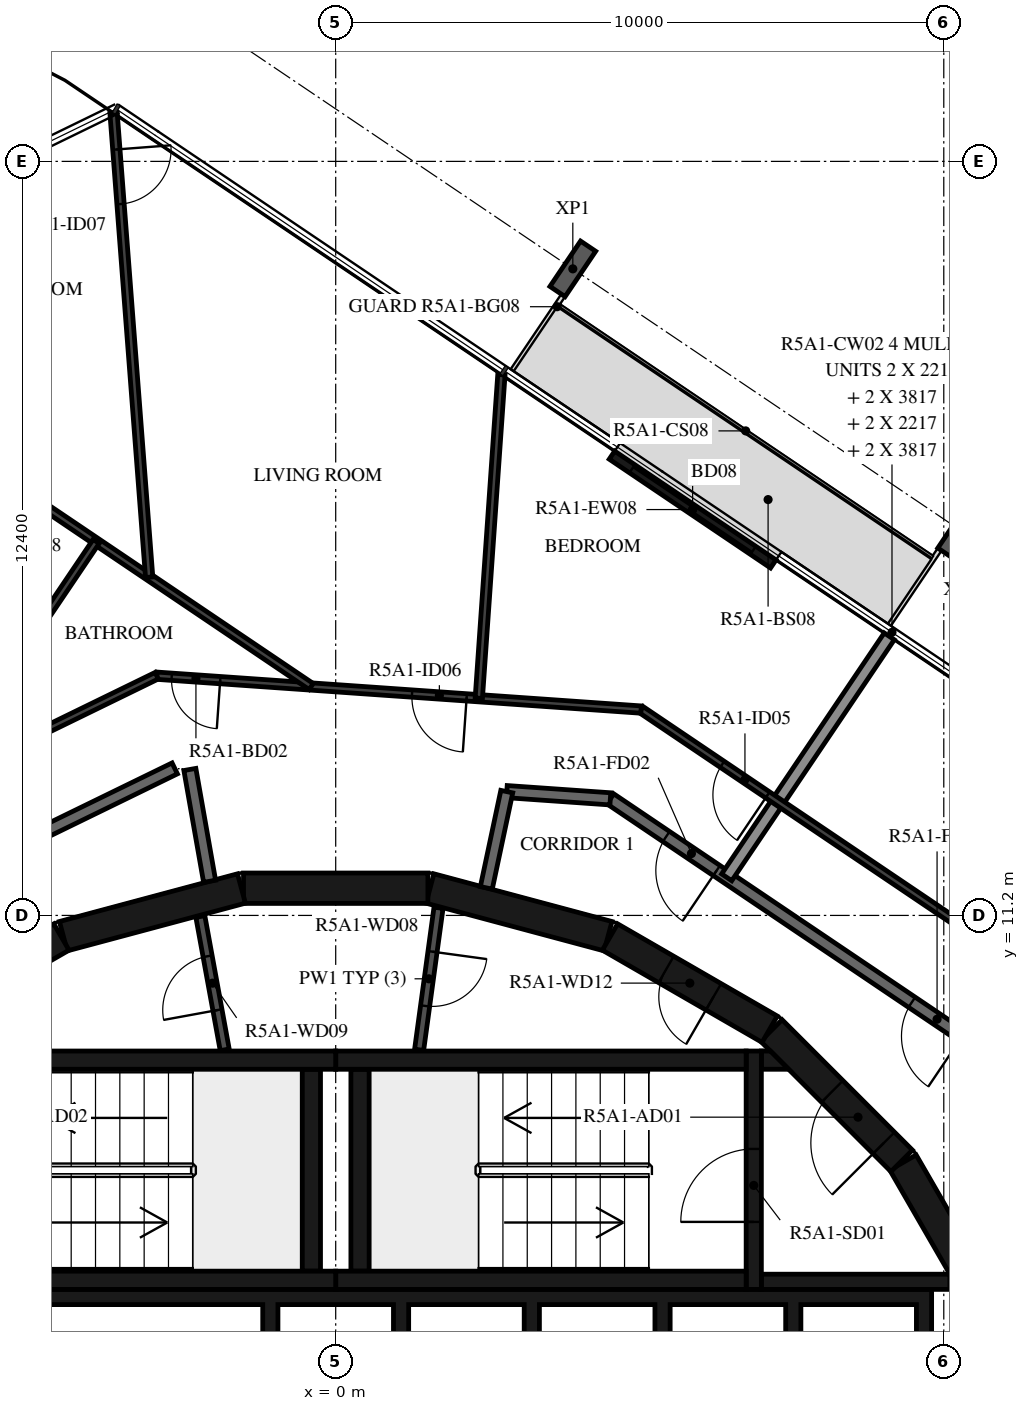
"""IFC4 building model, lengths in metres.
Left out: names, types, materials, properties, quantities, classifications, styles, units other than length and angle.
Written with IfcOpenShell. Run it as: python <this file> out.ifc"""

import sys

from ifc_helpers import new_model, si_unit, direction, frame, frame_2d, origin, origin_2d, place, context, subcontext, project, spatial, polyline, rectangle, i_section, outline, extrude, element, fill, save


model = new_model("IFC4")
c1 = context("Model", 3, precision=1e-05, world=origin(), true_north=direction((0.0, 1.0)))
c2 = subcontext(c1, "Body", "Model", "MODEL_VIEW")
j1 = project(units=[si_unit("LENGTHUNIT", "METRE"), si_unit("PLANEANGLEUNIT", "RADIAN")], contexts=[c1])
p1 = place(None, origin())
s1 = spatial("IfcSite", under=j1, at=p1, CompositionType="ELEMENT")
p2 = place(p1, origin())
s2 = spatial("IfcBuilding", under=s1, at=p2, CompositionType="ELEMENT")
p3 = place(p2, frame((0.0, 0.0, 191.9)))
s3 = spatial("IfcBuildingStorey", under=s2, at=p3, CompositionType="ELEMENT", Elevation=191.9)
for number, where, z_axis, x_axis in (
    (1, (10.278, 17.531, -0.38), (0.0, 0.0, 1.0), (0.829, -0.559, 0.0)),
    (2, (3.899, 21.833, -0.38), (0.0, 0.0, 1.0), (0.829, -0.559, 0.0)),
):
    element("IfcColumn", number, at=place(p3, frame(where, z_axis=z_axis, x_axis=x_axis)), inside=s3, PredefinedType="COLUMN", context=c2, shape_type="SweptSolid", body=[
        extrude(i_section(OverallWidth=0.3, OverallDepth=0.9, WebThickness=0.019, FlangeThickness=0.035, FilletRadius=0.03, at=origin_2d()), origin(), (0.0, 0.0, 1.0), 3.5),
    ])
p4 = place(p3, frame((7.196, 16.98, 0.0), z_axis=(0.0, 0.0, 1.0), x_axis=(-0.829044984211, 0.559181915082, 0.0)))
e3 = element("IfcWall", 3, at=p4, inside=s3, PredefinedType="STANDARD", context=c2, shape_type="SweptSolid", body=[
    extrude(rectangle(XDim=3.2, YDim=0.16, at=frame_2d((1.6, 0.0))), origin(), (0.0, 0.0, 1.0), 3.12),
])
p5 = place(p4, frame((0.4, 0.0, 0.0)))
e4 = element("IfcOpeningElement", 4, at=p5, cuts=e3, PredefinedType="OPENING", context=c2, shape_type="SweptSolid", body=[
    extrude(rectangle(XDim=2.4, YDim=2.4, at=frame_2d((1.2, 1.2))), frame((0.0, 0.09, 0.0), z_axis=(0.0, -1.0, 0.0), x_axis=(1.0, 0.0, 0.0)), (0.0, 0.0, 1.0), 0.18),
])
p6 = place(p3, frame((10.845, 4.51, 0.0), z_axis=(0.0, 0.0, 1.0), x_axis=(-0.500087131594, 0.865975092491, 0.0)))
e5 = element("IfcWall", 5, at=p6, inside=s3, PredefinedType="SHEAR", context=c2, shape_type="SweptSolid", body=[
    extrude(rectangle(XDim=3.033, YDim=0.5, at=frame_2d((1.516, 0.0))), origin(), (0.0, 0.0, 1.0), 3.12),
])
p7 = place(p3, frame((9.308, 7.164, 0.0), z_axis=(0.0, 0.0, 1.0), x_axis=(-0.707106781187, 0.707106781187, 0.0)))
e6 = element("IfcWall", 6, at=p7, inside=s3, PredefinedType="SHEAR", context=c2, shape_type="SweptSolid", body=[
    extrude(rectangle(XDim=3.032, YDim=0.5, at=frame_2d((1.516, 0.0))), origin(), (0.0, 0.0, 1.0), 3.12),
])
p8 = place(p7, frame((0.416, 0.0, 0.0)))
e7 = element("IfcOpeningElement", 7, at=p8, cuts=e6, PredefinedType="OPENING", context=c2, shape_type="SweptSolid", body=[
    extrude(rectangle(XDim=1.2, YDim=2.1, at=frame_2d((0.6, 1.05))), frame((0.0, 0.26, 0.0), z_axis=(0.0, -1.0, 0.0), x_axis=(1.0, 0.0, 0.0)), (0.0, 0.0, 1.0), 0.52),
])
p9 = place(p3, frame((7.137, 9.329, 0.0), z_axis=(0.0, 0.0, 1.0), x_axis=(-0.865975092491, 0.500087131594, 0.0)))
e8 = element("IfcWall", 8, at=p9, inside=s3, PredefinedType="SHEAR", context=c2, shape_type="SweptSolid", body=[
    extrude(rectangle(XDim=3.033, YDim=0.5, at=frame_2d((1.516, 0.0))), origin(), (0.0, 0.0, 1.0), 3.12),
])
p10 = place(p9, frame((1.066, 0.0, 0.0)))
e9 = element("IfcOpeningElement", 9, at=p10, cuts=e8, PredefinedType="OPENING", context=c2, shape_type="SweptSolid", body=[
    extrude(rectangle(XDim=0.9, YDim=2.1, at=frame_2d((0.45, 1.05))), frame((0.0, 0.26, 0.0), z_axis=(0.0, -1.0, 0.0), x_axis=(1.0, 0.0, 0.0)), (0.0, 0.0, 1.0), 0.52),
])
for number, where, z_axis, x_axis in (
    (10, (4.479, 10.858, 0.0), (0.0, 0.0, 1.0), (-0.966, 0.259, 0.0)),
    (11, (1.516, 11.647, 0.0), (0.0, 0.0, 1.0), (-1.0, 0.0, 0.0)),
    (12, (-1.55, 11.643, 0.0), (0.0, 0.0, 1.0), (-0.966, -0.259, 0.0)),
    (13, (-4.51, 10.845, 0.0), (0.0, 0.0, 1.0), (-0.866, -0.5, 0.0)),
):
    element("IfcWall", number, at=place(p3, frame(where, z_axis=z_axis, x_axis=x_axis)), inside=s3, PredefinedType="SHEAR", context=c2, shape_type="SweptSolid", body=[
        extrude(rectangle(XDim=3.033, YDim=0.5, at=frame_2d((1.516, 0.0))), origin(), (0.0, 0.0, 1.0), 3.12),
    ])
for number, where, z_axis, x_axis in (
    (14, (0.0, 5.2, 0.0), (0.0, 0.0, 1.0), (1.0, 0.0, 0.0)),
    (15, (0.0, 8.82, 0.0), (0.0, 0.0, 1.0), (1.0, 0.0, 0.0)),
):
    element("IfcWall", number, at=place(p3, frame(where, z_axis=z_axis, x_axis=x_axis)), inside=s3, PredefinedType="SHEAR", context=c2, shape_type="SweptSolid", body=[
        extrude(rectangle(XDim=6.75, YDim=0.3, at=frame_2d((3.375, 0.0))), origin(), (0.0, 0.0, 1.0), 3.12),
    ])
p11 = place(p3, frame((0.4, 5.35, 0.0), z_axis=(0.0, 0.0, 1.0), x_axis=(0.0, 1.0, 0.0)))
e16 = element("IfcWall", 16, at=p11, inside=s3, PredefinedType="SHEAR", context=c2, shape_type="SweptSolid", body=[
    extrude(rectangle(XDim=3.32, YDim=0.3, at=frame_2d((1.66, 0.0))), origin(), (0.0, 0.0, 1.0), 3.12),
])
p12 = place(p3, frame((6.875, 5.05, 0.0), z_axis=(0.0, 0.0, 1.0), x_axis=(0.0, 1.0, 0.0)))
e17 = element("IfcWall", 17, at=p12, inside=s3, PredefinedType="SHEAR", context=c2, shape_type="SweptSolid", body=[
    extrude(rectangle(XDim=3.92, YDim=0.25, at=frame_2d((1.96, 0.0))), origin(), (0.0, 0.0, 1.0), 3.12),
])
p13 = place(p12, frame((1.11, 0.0, 0.0)))
e18 = element("IfcOpeningElement", 18, at=p13, cuts=e17, PredefinedType="OPENING", context=c2, shape_type="SweptSolid", body=[
    extrude(rectangle(XDim=1.2, YDim=2.1, at=frame_2d((0.6, 1.05))), frame((0.0, 0.135, 0.0), z_axis=(0.0, -1.0, 0.0), x_axis=(1.0, 0.0, 0.0)), (0.0, 0.0, 1.0), 0.27),
])
p14 = place(p3, frame((7.0, 5.175, 0.0), z_axis=(0.0, 0.0, 1.0), x_axis=(1.0, 0.0, 0.0)))
e19 = element("IfcWall", 19, at=p14, inside=s3, PredefinedType="SHEAR", context=c2, shape_type="SweptSolid", body=[
    extrude(rectangle(XDim=3.1, YDim=0.25, at=frame_2d((1.55, 0.0))), origin(), (0.0, 0.0, 1.0), 3.12),
])
p15 = place(p3, origin())
e20 = element("IfcWall", 20, at=p15, inside=s3, PredefinedType="SHEAR", context=c2, shape_type="SweptSolid", body=[
    extrude(outline(polyline([(7.448, 8.67), (7.0, 8.67), (7.0, 8.97), (7.148, 8.97), (7.448, 8.67)])), origin(), (0.0, 0.0, 1.0), 3.12),
])
for number, where, z_axis, x_axis in (
    (21, (-6.75, 5.2, 0.0), (0.0, 0.0, 1.0), (1.0, 0.0, 0.0)),
    (22, (-6.75, 8.82, 0.0), (0.0, 0.0, 1.0), (1.0, 0.0, 0.0)),
):
    element("IfcWall", number, at=place(p3, frame(where, z_axis=z_axis, x_axis=x_axis)), inside=s3, PredefinedType="SHEAR", context=c2, shape_type="SweptSolid", body=[
        extrude(rectangle(XDim=6.75, YDim=0.3, at=frame_2d((3.375, 0.0))), origin(), (0.0, 0.0, 1.0), 3.12),
    ])
p16 = place(p3, frame((-0.4, 5.35, 0.0), z_axis=(0.0, 0.0, 1.0), x_axis=(0.0, 1.0, 0.0)))
e23 = element("IfcWall", 23, at=p16, inside=s3, PredefinedType="SHEAR", context=c2, shape_type="SweptSolid", body=[
    extrude(rectangle(XDim=3.32, YDim=0.3, at=frame_2d((1.66, 0.0))), origin(), (0.0, 0.0, 1.0), 3.12),
])
p17 = place(p3, origin())
e24 = element("IfcWall", 24, at=p17, inside=s3, PredefinedType="SHEAR", context=c2, shape_type="SweptSolid", body=[
    extrude(outline(polyline([(-9.55, 4.8), (-5.5, 4.8), (-5.5, 1.9), (-5.25, 1.9), (-5.25, 4.8), (-1.2, 4.8), (-1.2, 1.9), (-0.95, 1.9), (-0.95, 4.8), (0.95, 4.8), (0.95, 1.9), (1.2, 1.9), (1.2, 4.8), (3.1, 4.8), (3.1, 1.9), (3.35, 1.9), (3.35, 4.8), (5.25, 4.8), (5.25, 1.9), (5.5, 1.9), (5.5, 4.8), (7.4, 4.8), (7.4, 1.9), (7.65, 1.9), (7.65, 4.8), (9.55, 4.8), (9.55, 1.9), (9.8, 1.9), (9.8, 4.8), (9.8, 5.05), (-9.8, 5.05), (-9.8, 4.8), (-9.8, 1.9), (-9.55, 1.9), (-9.55, 4.8)])), origin(), (0.0, 0.0, 1.0), 3.12),
])
p18 = place(p3, frame((1.691, 11.326, 0.0), z_axis=(0.0, 0.0, 1.0), x_axis=(-0.135344253201, -0.990798633994, 0.0)))
e25 = element("IfcWall", 25, at=p18, inside=s3, PredefinedType="PARTITIONING", context=c2, shape_type="SweptSolid", body=[
    extrude(rectangle(XDim=2.358, YDim=0.15, at=frame_2d((1.179, 0.0))), origin(), (0.0, 0.0, 1.0), 3.12),
])
p19 = place(p18, frame((0.729, 0.0, 0.0)))
e26 = element("IfcOpeningElement", 26, at=p19, cuts=e25, PredefinedType="OPENING", context=c2, shape_type="SweptSolid", body=[
    extrude(rectangle(XDim=0.9, YDim=2.1, at=frame_2d((0.45, 1.05))), frame((0.0, 0.085, 0.0), z_axis=(0.0, -1.0, 0.0), x_axis=(1.0, 0.0, 0.0)), (0.0, 0.0, 1.0), 0.17),
])
p20 = place(p3, frame((-1.825, 8.99, 0.0), z_axis=(0.0, 0.0, 1.0), x_axis=(-0.179955206115, 0.983674805915, 0.0)))
e27 = element("IfcWall", 27, at=p20, inside=s3, PredefinedType="PARTITIONING", context=c2, shape_type="SweptSolid", body=[
    extrude(rectangle(XDim=2.229, YDim=0.15, at=frame_2d((1.115, 0.0))), origin(), (0.0, 0.0, 1.0), 3.12),
])
p21 = place(p20, frame((0.665, 0.0, 0.0)))
e28 = element("IfcOpeningElement", 28, at=p21, cuts=e27, PredefinedType="OPENING", context=c2, shape_type="SweptSolid", body=[
    extrude(rectangle(XDim=0.9, YDim=2.1, at=frame_2d((0.45, 1.05))), frame((0.0, 0.085, 0.0), z_axis=(0.0, -1.0, 0.0), x_axis=(1.0, 0.0, 0.0)), (0.0, 0.0, 1.0), 0.17),
])
p22 = place(p3, frame((10.47, 9.101, 0.0), z_axis=(0.0, 0.0, 1.0), x_axis=(-0.829035841718, 0.559195469534, 0.0)))
e29 = element("IfcWall", 29, at=p22, inside=s3, PredefinedType="STANDARD", context=c2, shape_type="SweptSolid", body=[
    extrude(rectangle(XDim=7.181, YDim=0.2, at=frame_2d((3.591, 0.0))), origin(), (0.0, 0.0, 1.0), 3.12),
])
p23 = place(p22, frame((0.2, 0.0, 0.0)))
e30 = element("IfcOpeningElement", 30, at=p23, cuts=e29, PredefinedType="OPENING", context=c2, shape_type="SweptSolid", body=[
    extrude(rectangle(XDim=1.0, YDim=2.1, at=frame_2d((0.5, 1.05))), frame((0.0, 0.11, 0.0), z_axis=(0.0, -1.0, 0.0), x_axis=(1.0, 0.0, 0.0)), (0.0, 0.0, 1.0), 0.22),
])
p24 = place(p22, frame((5.073, 0.0, 0.0)))
e31 = element("IfcOpeningElement", 31, at=p24, cuts=e29, PredefinedType="OPENING", context=c2, shape_type="SweptSolid", body=[
    extrude(rectangle(XDim=1.0, YDim=2.1, at=frame_2d((0.5, 1.05))), frame((0.0, 0.11, 0.0), z_axis=(0.0, -1.0, 0.0), x_axis=(1.0, 0.0, 0.0)), (0.0, 0.0, 1.0), 0.22),
])
p25 = place(p3, frame((4.517, 13.117, 0.0), z_axis=(0.0, 0.0, 1.0), x_axis=(-0.997562153664, 0.069783591025, 0.0)))
e32 = element("IfcWall", 32, at=p25, inside=s3, PredefinedType="STANDARD", context=c2, shape_type="SweptSolid", body=[
    extrude(rectangle(XDim=1.707, YDim=0.2, at=frame_2d((0.854, 0.0))), origin(), (0.0, 0.0, 1.0), 3.12),
])
p26 = place(p3, frame((2.813, 13.236, 0.0), z_axis=(0.0, 0.0, 1.0), x_axis=(-0.207911086063, -0.978147729278, 0.0)))
e33 = element("IfcWall", 33, at=p26, inside=s3, PredefinedType="STANDARD", context=c2, shape_type="SweptSolid", body=[
    extrude(rectangle(XDim=1.618, YDim=0.2, at=frame_2d((0.809, 0.0))), origin(), (0.0, 0.0, 1.0), 3.12),
])
p27 = place(p3, frame((-2.074, 11.761, 0.0), z_axis=(0.0, 0.0, 1.0), x_axis=(-0.173740587112, 0.984791454263, 0.0)))
e34 = element("IfcWall", 34, at=p27, inside=s3, PredefinedType="STANDARD", context=c2, shape_type="SweptSolid", body=[
    extrude(rectangle(XDim=1.867, YDim=0.2, at=frame_2d((0.934, 0.0))), origin(), (0.0, 0.0, 1.0), 3.12),
])
p28 = place(p3, frame((-2.647, 13.618, 0.0), z_axis=(0.0, 0.0, 1.0), x_axis=(-0.898796543751, -0.438366026218, 0.0)))
e35 = element("IfcWall", 35, at=p28, inside=s3, PredefinedType="STANDARD", context=c2, shape_type="SweptSolid", body=[
    extrude(rectangle(XDim=7.181, YDim=0.2, at=frame_2d((3.591, 0.0))), origin(), (0.0, 0.0, 1.0), 3.12),
])
p29 = place(p3, frame((9.104, 15.79, 0.0), z_axis=(0.0, 0.0, 1.0), x_axis=(-0.559193912135, -0.829036892201, 0.0)))
e36 = element("IfcWall", 36, at=p29, inside=s3, PredefinedType="STANDARD", context=c2, shape_type="SweptSolid", body=[
    extrude(rectangle(XDim=4.781, YDim=0.2, at=frame_2d((2.39, 0.0))), origin(), (0.0, 0.0, 1.0), 2.73),
])
p30 = place(p3, frame((11.642, 10.12, 0.0), z_axis=(0.0, 0.0, 1.0), x_axis=(-0.829032241779, 0.55920080659, 0.0)))
e37 = element("IfcWall", 37, at=p30, inside=s3, PredefinedType="PARTITIONING", context=c2, shape_type="SweptSolid", body=[
    extrude(rectangle(XDim=7.985, YDim=0.12, at=frame_2d((3.992, 0.0))), origin(), (0.0, 0.0, 1.0), 3.12),
])
p31 = place(p30, frame((0.2, 0.0, 0.0)))
e38 = element("IfcOpeningElement", 38, at=p31, cuts=e37, PredefinedType="OPENING", context=c2, shape_type="SweptSolid", body=[
    extrude(rectangle(XDim=0.9, YDim=2.1, at=frame_2d((0.45, 1.05))), frame((0.0, 0.07, 0.0), z_axis=(0.0, -1.0, 0.0), x_axis=(1.0, 0.0, 0.0)), (0.0, 0.0, 1.0), 0.14),
])
p32 = place(p30, frame((5.475, 0.0, 0.0)))
e39 = element("IfcOpeningElement", 39, at=p32, cuts=e37, PredefinedType="OPENING", context=c2, shape_type="SweptSolid", body=[
    extrude(rectangle(XDim=0.9, YDim=2.1, at=frame_2d((0.45, 1.05))), frame((0.0, 0.07, 0.0), z_axis=(0.0, -1.0, 0.0), x_axis=(1.0, 0.0, 0.0)), (0.0, 0.0, 1.0), 0.14),
])
p33 = place(p3, frame((5.022, 14.585, 0.0), z_axis=(0.0, 0.0, 1.0), x_axis=(-0.997565118395, 0.069741197017, 0.0)))
e40 = element("IfcWall", 40, at=p33, inside=s3, PredefinedType="PARTITIONING", context=c2, shape_type="SweptSolid", body=[
    extrude(rectangle(XDim=7.985, YDim=0.12, at=frame_2d((3.993, 0.0))), origin(), (0.0, 0.0, 1.0), 3.12),
])
p34 = place(p33, frame((2.875, 0.0, 0.0)))
e41 = element("IfcOpeningElement", 41, at=p34, cuts=e40, PredefinedType="OPENING", context=c2, shape_type="SweptSolid", body=[
    extrude(rectangle(XDim=0.9, YDim=2.1, at=frame_2d((0.45, 1.05))), frame((0.0, 0.07, 0.0), z_axis=(0.0, -1.0, 0.0), x_axis=(1.0, 0.0, 0.0)), (0.0, 0.0, 1.0), 0.14),
])
p35 = place(p33, frame((6.938, 0.0, 0.0)))
e42 = element("IfcOpeningElement", 42, at=p35, cuts=e40, PredefinedType="OPENING", context=c2, shape_type="SweptSolid", body=[
    extrude(rectangle(XDim=0.8, YDim=2.1, at=frame_2d((0.4, 1.05))), frame((0.0, 0.07, 0.0), z_axis=(0.0, -1.0, 0.0), x_axis=(1.0, 0.0, 0.0)), (0.0, 0.0, 1.0), 0.14),
])
p36 = place(p3, frame((-2.943, 15.142, 0.0), z_axis=(0.0, 0.0, 1.0), x_axis=(-0.89881075705, -0.438336883014, 0.0)))
e43 = element("IfcWall", 43, at=p36, inside=s3, PredefinedType="PARTITIONING", context=c2, shape_type="SweptSolid", body=[
    extrude(rectangle(XDim=3.992, YDim=0.12, at=frame_2d((1.996, 0.0))), origin(), (0.0, 0.0, 1.0), 3.12),
])
p37 = place(p3, frame((2.725, 20.092, 0.0), z_axis=(0.0, 0.0, 1.0), x_axis=(-0.069766716578, -0.997563333958, 0.0)))
e44 = element("IfcWall", 44, at=p37, inside=s3, PredefinedType="PARTITIONING", context=c2, shape_type="SweptSolid", body=[
    extrude(rectangle(XDim=5.333, YDim=0.12, at=frame_2d((2.667, 0.0))), origin(), (0.0, 0.0, 1.0), 3.12),
])
p38 = place(p3, frame((-7.476, 19.735, 0.0), z_axis=(0.0, 0.0, 1.0), x_axis=(0.829035412992, -0.559196105142, 0.0)))
e45 = element("IfcWall", 45, at=p38, inside=s3, PredefinedType="PARTITIONING", context=c2, shape_type="SweptSolid", body=[
    extrude(rectangle(XDim=8.531, YDim=0.12, at=frame_2d((4.266, 0.0))), origin(), (0.0, 0.0, 1.0), 3.12),
])
p39 = place(p38, frame((2.204, 0.0, 0.0)))
e46 = element("IfcOpeningElement", 46, at=p39, cuts=e45, PredefinedType="OPENING", context=c2, shape_type="SweptSolid", body=[
    extrude(rectangle(XDim=0.9, YDim=2.1, at=frame_2d((0.45, 1.05))), frame((0.0, 0.07, 0.0), z_axis=(0.0, -1.0, 0.0), x_axis=(1.0, 0.0, 0.0)), (0.0, 0.0, 1.0), 0.14),
])
p40 = place(p3, frame((-3.653, 24.394, 0.0), z_axis=(0.0, 0.0, 1.0), x_axis=(0.076513576433, -0.997068539581, 0.0)))
e47 = element("IfcWall", 47, at=p40, inside=s3, PredefinedType="PARTITIONING", context=c2, shape_type="SweptSolid", body=[
    extrude(rectangle(XDim=7.655, YDim=0.12, at=frame_2d((3.827, 0.0))), origin(), (0.0, 0.0, 1.0), 3.12),
])
p41 = place(p40, frame((0.6, 0.0, 0.0)))
e48 = element("IfcOpeningElement", 48, at=p41, cuts=e47, PredefinedType="OPENING", context=c2, shape_type="SweptSolid", body=[
    extrude(rectangle(XDim=0.9, YDim=2.1, at=frame_2d((0.45, 1.05))), frame((0.0, 0.07, 0.0), z_axis=(0.0, -1.0, 0.0), x_axis=(1.0, 0.0, 0.0)), (0.0, 0.0, 1.0), 0.14),
])
p42 = place(p3, frame((-3.939, 17.35, 0.0), z_axis=(0.0, 0.0, 1.0), x_axis=(-0.559193216274, -0.829037361566, 0.0)))
e49 = element("IfcWall", 49, at=p42, inside=s3, PredefinedType="PARTITIONING", context=c2, shape_type="SweptSolid", body=[
    extrude(rectangle(XDim=4.694, YDim=0.12, at=frame_2d((2.347, 0.0))), origin(), (0.0, 0.0, 1.0), 3.12),
])
p43 = place(p5, origin())
e50 = element("IfcDoor", 50, at=p43, inside=s3, OperationType="DOUBLE_DOOR_SLIDING", PredefinedType="DOOR", context=c2, shape_type="SweptSolid", body=[
    extrude(rectangle(XDim=2.4, YDim=2.4, at=frame_2d((1.2, 1.2))), frame((0.0, 0.025, 0.0), z_axis=(0.0, -1.0, 0.0), x_axis=(1.0, 0.0, 0.0)), (0.0, 0.0, 1.0), 0.05),
])
fill(e4, e50)
p44 = place(p13, origin())
e51 = element("IfcDoor", 51, at=p44, inside=s3, OperationType="SINGLE_SWING_LEFT", PredefinedType="DOOR", context=c2, shape_type="SweptSolid", body=[
    extrude(rectangle(XDim=1.2, YDim=2.1, at=frame_2d((0.6, 1.05))), frame((0.0, 0.025, 0.0), z_axis=(0.0, -1.0, 0.0), x_axis=(1.0, 0.0, 0.0)), (0.0, 0.0, 1.0), 0.05),
])
fill(e18, e51)
p45 = place(p8, origin())
e52 = element("IfcDoor", 52, at=p45, inside=s3, OperationType="SINGLE_SWING_RIGHT", PredefinedType="DOOR", context=c2, shape_type="SweptSolid", body=[
    extrude(rectangle(XDim=1.2, YDim=2.1, at=frame_2d((0.6, 1.05))), frame((0.0, 0.025, 0.0), z_axis=(0.0, -1.0, 0.0), x_axis=(1.0, 0.0, 0.0)), (0.0, 0.0, 1.0), 0.05),
])
fill(e7, e52)
p46 = place(p19, origin())
e53 = element("IfcDoor", 53, at=p46, inside=s3, OperationType="SINGLE_SWING_RIGHT", PredefinedType="DOOR", context=c2, shape_type="SweptSolid", body=[
    extrude(rectangle(XDim=0.9, YDim=2.1, at=frame_2d((0.45, 1.05))), frame((0.0, 0.025, 0.0), z_axis=(0.0, -1.0, 0.0), x_axis=(1.0, 0.0, 0.0)), (0.0, 0.0, 1.0), 0.05),
])
fill(e26, e53)
p47 = place(p21, origin())
e54 = element("IfcDoor", 54, at=p47, inside=s3, OperationType="SINGLE_SWING_LEFT", PredefinedType="DOOR", context=c2, shape_type="SweptSolid", body=[
    extrude(rectangle(XDim=0.9, YDim=2.1, at=frame_2d((0.45, 1.05))), frame((0.0, 0.025, 0.0), z_axis=(0.0, -1.0, 0.0), x_axis=(1.0, 0.0, 0.0)), (0.0, 0.0, 1.0), 0.05),
])
fill(e28, e54)
p48 = place(p10, origin())
e55 = element("IfcDoor", 55, at=p48, inside=s3, OperationType="SINGLE_SWING_RIGHT", PredefinedType="DOOR", context=c2, shape_type="SweptSolid", body=[
    extrude(rectangle(XDim=0.9, YDim=2.1, at=frame_2d((0.45, 1.05))), frame((0.0, 0.025, 0.0), z_axis=(0.0, -1.0, 0.0), x_axis=(1.0, 0.0, 0.0)), (0.0, 0.0, 1.0), 0.05),
])
fill(e9, e55)
p49 = place(p23, origin())
e56 = element("IfcDoor", 56, at=p49, inside=s3, OperationType="SINGLE_SWING_LEFT", PredefinedType="DOOR", context=c2, shape_type="SweptSolid", body=[
    extrude(rectangle(XDim=1.0, YDim=2.1, at=frame_2d((0.5, 1.05))), frame((0.0, 0.025, 0.0), z_axis=(0.0, -1.0, 0.0), x_axis=(1.0, 0.0, 0.0)), (0.0, 0.0, 1.0), 0.05),
])
fill(e30, e56)
p50 = place(p24, origin())
e57 = element("IfcDoor", 57, at=p50, inside=s3, OperationType="SINGLE_SWING_RIGHT", PredefinedType="DOOR", context=c2, shape_type="SweptSolid", body=[
    extrude(rectangle(XDim=1.0, YDim=2.1, at=frame_2d((0.5, 1.05))), frame((0.0, 0.025, 0.0), z_axis=(0.0, -1.0, 0.0), x_axis=(1.0, 0.0, 0.0)), (0.0, 0.0, 1.0), 0.05),
])
fill(e31, e57)
p51 = place(p32, origin())
e58 = element("IfcDoor", 58, at=p51, inside=s3, OperationType="SINGLE_SWING_RIGHT", PredefinedType="DOOR", context=c2, shape_type="SweptSolid", body=[
    extrude(rectangle(XDim=0.9, YDim=2.1, at=frame_2d((0.45, 1.05))), frame((0.0, 0.025, 0.0), z_axis=(0.0, -1.0, 0.0), x_axis=(1.0, 0.0, 0.0)), (0.0, 0.0, 1.0), 0.05),
])
fill(e39, e58)
p52 = place(p34, origin())
e59 = element("IfcDoor", 59, at=p52, inside=s3, OperationType="SINGLE_SWING_RIGHT", PredefinedType="DOOR", context=c2, shape_type="SweptSolid", body=[
    extrude(rectangle(XDim=0.9, YDim=2.1, at=frame_2d((0.45, 1.05))), frame((0.0, 0.025, 0.0), z_axis=(0.0, -1.0, 0.0), x_axis=(1.0, 0.0, 0.0)), (0.0, 0.0, 1.0), 0.05),
])
fill(e41, e59)
p53 = place(p35, origin())
e60 = element("IfcDoor", 60, at=p53, inside=s3, OperationType="SINGLE_SWING_RIGHT", PredefinedType="DOOR", context=c2, shape_type="SweptSolid", body=[
    extrude(rectangle(XDim=0.8, YDim=2.1, at=frame_2d((0.4, 1.05))), frame((0.0, 0.025, 0.0), z_axis=(0.0, -1.0, 0.0), x_axis=(1.0, 0.0, 0.0)), (0.0, 0.0, 1.0), 0.05),
])
fill(e42, e60)
p54 = place(p41, origin())
e61 = element("IfcDoor", 61, at=p54, inside=s3, OperationType="SINGLE_SWING_RIGHT", PredefinedType="DOOR", context=c2, shape_type="SweptSolid", body=[
    extrude(rectangle(XDim=0.9, YDim=2.1, at=frame_2d((0.45, 1.05))), frame((0.0, 0.025, 0.0), z_axis=(0.0, -1.0, 0.0), x_axis=(1.0, 0.0, 0.0)), (0.0, 0.0, 1.0), 0.05),
])
fill(e48, e61)
save(model, sys.argv[1])
